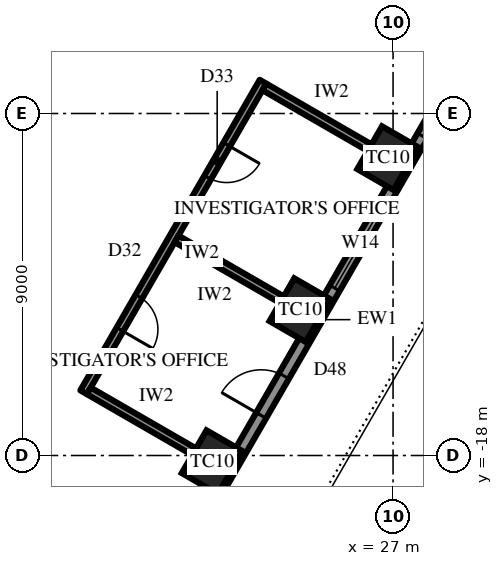
"""IFC4 building model, lengths in metres.
Left out: names, types, materials, properties, quantities, classifications, styles, units other than length and angle.
Written with IfcOpenShell. Run it as: python <this file> out.ifc"""

import sys

from ifc_helpers import new_model, si_unit, direction, frame, frame_2d, origin, origin_2d, place, context, subcontext, project, spatial, rectangle, extrude, element, fill, save


model = new_model("IFC4")
c1 = context("Model", 3, precision=1e-05, world=origin(), true_north=direction((0.0, 1.0)))
c2 = subcontext(c1, "Body", "Model", "MODEL_VIEW")
j1 = project(units=[si_unit("LENGTHUNIT", "METRE"), si_unit("PLANEANGLEUNIT", "RADIAN")], contexts=[c1])
p1 = place(None, origin())
s1 = spatial("IfcSite", under=j1, at=p1, CompositionType="ELEMENT")
p2 = place(p1, origin())
s2 = spatial("IfcBuilding", under=s1, at=p2, CompositionType="ELEMENT")
p3 = place(p2, frame((0.0, 0.0, 240.7)))
s3 = spatial("IfcBuildingStorey", under=s2, at=p3, CompositionType="ELEMENT", Elevation=240.7)
for number, where, z_axis, x_axis in (
    (1, (22.242, -18.175, 0.0), (0.0, 0.0, 1.0), (0.5, 0.866, 0.0)),
    (2, (24.552, -14.175, 0.0), (0.0, 0.0, 1.0), (0.5, 0.866, 0.0)),
    (3, (26.861, -10.175, 0.0), (0.0, 0.0, 1.0), (0.5, 0.866, 0.0)),
):
    element("IfcColumn", number, at=place(p3, frame(where, z_axis=z_axis, x_axis=x_axis)), inside=s3, PredefinedType="COLUMN", context=c2, shape_type="SweptSolid", body=[
        extrude(rectangle(XDim=1.3, YDim=1.1, at=origin_2d()), origin(), (0.0, 0.0, 1.0), 4.2),
    ])
p4 = place(p3, frame((18.707, -25.299, 0.0), z_axis=(0.0, 0.0, 1.0), x_axis=(0.500000442367, 0.866025148383, 0.0)))
e4 = element("IfcWall", 4, at=p4, inside=s3, PredefinedType="SOLIDWALL", context=c2, shape_type="SweptSolid", body=[
    extrude(rectangle(XDim=25.113, YDim=0.3, at=frame_2d((12.556, 0.0))), origin(), (0.0, 0.0, 1.0), 2.8),
])
p5 = place(p4, frame((4.278, 0.0, 0.6)))
e5 = element("IfcOpeningElement", 5, at=p5, cuts=e4, PredefinedType="OPENING", context=c2, shape_type="SweptSolid", body=[
    extrude(rectangle(XDim=2.7, YDim=1.95, at=frame_2d((1.35, 0.975))), frame((0.0, 0.16, 0.0), z_axis=(0.0, -1.0, 0.0), x_axis=(1.0, 0.0, 0.0)), (0.0, 0.0, 1.0), 0.32),
])
p6 = place(p4, frame((9.647, 0.0, 0.0)))
e6 = element("IfcOpeningElement", 6, at=p6, cuts=e4, PredefinedType="OPENING", context=c2, shape_type="SweptSolid", body=[
    extrude(rectangle(XDim=1.2, YDim=2.4, at=frame_2d((0.6, 1.2))), frame((0.0, 0.16, 0.0), z_axis=(0.0, -1.0, 0.0), x_axis=(1.0, 0.0, 0.0)), (0.0, 0.0, 1.0), 0.32),
])
p7 = place(p4, frame((13.516, 0.0, 0.6)))
e7 = element("IfcOpeningElement", 7, at=p7, cuts=e4, PredefinedType="OPENING", context=c2, shape_type="SweptSolid", body=[
    extrude(rectangle(XDim=2.7, YDim=1.95, at=frame_2d((1.35, 0.975))), frame((0.0, 0.16, 0.0), z_axis=(0.0, -1.0, 0.0), x_axis=(1.0, 0.0, 0.0)), (0.0, 0.0, 1.0), 0.32),
])
p8 = place(p4, frame((18.135, 0.0, 0.6)))
e8 = element("IfcOpeningElement", 8, at=p8, cuts=e4, PredefinedType="OPENING", context=c2, shape_type="SweptSolid", body=[
    extrude(rectangle(XDim=2.7, YDim=1.95, at=frame_2d((1.35, 0.975))), frame((0.0, 0.16, 0.0), z_axis=(0.0, -1.0, 0.0), x_axis=(1.0, 0.0, 0.0)), (0.0, 0.0, 1.0), 0.32),
])
p9 = place(p3, frame((18.858, -16.337, 0.0), z_axis=(0.0, 0.0, 1.0), x_axis=(0.499989672313, 0.866031366395, 0.0)))
e9 = element("IfcWall", 9, at=p9, inside=s3, PredefinedType="PARTITIONING", context=c2, shape_type="SweptSolid", body=[
    extrude(rectangle(XDim=9.438, YDim=0.2, at=frame_2d((4.719, 0.0))), origin(), (0.0, 0.0, 1.0), 4.0),
])
p10 = place(p9, frame((1.909, 0.0, 0.0)))
e10 = element("IfcOpeningElement", 10, at=p10, cuts=e9, PredefinedType="OPENING", context=c2, shape_type="SweptSolid", body=[
    extrude(rectangle(XDim=1.0, YDim=2.2, at=frame_2d((0.5, 1.1))), frame((0.0, 0.11, 0.0), z_axis=(0.0, -1.0, 0.0), x_axis=(1.0, 0.0, 0.0)), (0.0, 0.0, 1.0), 0.22),
])
p11 = place(p9, frame((6.528, 0.0, 0.0)))
e11 = element("IfcOpeningElement", 11, at=p11, cuts=e9, PredefinedType="OPENING", context=c2, shape_type="SweptSolid", body=[
    extrude(rectangle(XDim=1.0, YDim=2.2, at=frame_2d((0.5, 1.1))), frame((0.0, 0.11, 0.0), z_axis=(0.0, -1.0, 0.0), x_axis=(1.0, 0.0, 0.0)), (0.0, 0.0, 1.0), 0.22),
])
for number, where, z_axis, x_axis in (
    (12, (18.995, -16.3, 0.0), (0.0, 0.0, 1.0), (0.866, -0.5, 0.0)),
    (13, (21.304, -12.3, 0.0), (0.0, 0.0, 1.0), (0.866, -0.5, 0.0)),
):
    element("IfcWall", number, at=place(p3, frame(where, z_axis=z_axis, x_axis=x_axis)), inside=s3, PredefinedType="PARTITIONING", context=c2, shape_type="SweptSolid", body=[
        extrude(rectangle(XDim=3.2, YDim=0.2, at=frame_2d((1.6, 0.0))), origin(), (0.0, 0.0, 1.0), 3.082),
    ])
p12 = place(p3, frame((23.614, -8.3, 0.0), z_axis=(0.0, 0.0, 1.0), x_axis=(0.866061088033, -0.499938187974, 0.0)))
e14 = element("IfcWall", 14, at=p12, inside=s3, PredefinedType="PARTITIONING", context=c2, shape_type="SweptSolid", body=[
    extrude(rectangle(XDim=3.2, YDim=0.2, at=frame_2d((1.6, 0.0))), origin(), (0.0, 0.0, 1.0), 3.082),
])
p13 = place(p6, origin())
e15 = element("IfcDoor", 15, at=p13, inside=s3, OperationType="SINGLE_SWING_RIGHT", PredefinedType="DOOR", context=c2, shape_type="SweptSolid", body=[
    extrude(rectangle(XDim=1.2, YDim=2.4, at=frame_2d((0.6, 1.2))), frame((0.0, 0.025, 0.0), z_axis=(0.0, -1.0, 0.0), x_axis=(1.0, 0.0, 0.0)), (0.0, 0.0, 1.0), 0.05),
])
fill(e6, e15)
p14 = place(p7, origin())
e16 = element("IfcWindow", 16, at=p14, inside=s3, PartitioningType="SINGLE_PANEL", PredefinedType="WINDOW", context=c2, shape_type="SweptSolid", body=[
    extrude(rectangle(XDim=2.7, YDim=1.95, at=frame_2d((1.35, 0.975))), frame((0.0, 0.03, 0.0), z_axis=(0.0, -1.0, 0.0), x_axis=(1.0, 0.0, 0.0)), (0.0, 0.0, 1.0), 0.06),
])
fill(e7, e16)
p15 = place(p8, origin())
e17 = element("IfcWindow", 17, at=p15, inside=s3, PartitioningType="SINGLE_PANEL", PredefinedType="WINDOW", context=c2, shape_type="SweptSolid", body=[
    extrude(rectangle(XDim=2.7, YDim=1.95, at=frame_2d((1.35, 0.975))), frame((0.0, 0.03, 0.0), z_axis=(0.0, -1.0, 0.0), x_axis=(1.0, 0.0, 0.0)), (0.0, 0.0, 1.0), 0.06),
])
fill(e8, e17)
p16 = place(p10, frame((1.0, 0.0, 0.0), z_axis=(0.0, 0.0, 1.0), x_axis=(-1.0, 0.0, 0.0)))
e18 = element("IfcDoor", 18, at=p16, inside=s3, OperationType="SINGLE_SWING_LEFT", PredefinedType="DOOR", context=c2, shape_type="SweptSolid", body=[
    extrude(rectangle(XDim=1.0, YDim=2.2, at=frame_2d((0.5, 1.1))), frame((0.0, 0.025, 0.0), z_axis=(0.0, -1.0, 0.0), x_axis=(1.0, 0.0, 0.0)), (0.0, 0.0, 1.0), 0.05),
])
fill(e10, e18)
p17 = place(p11, frame((1.0, 0.0, 0.0), z_axis=(0.0, 0.0, 1.0), x_axis=(-1.0, 0.0, 0.0)))
e19 = element("IfcDoor", 19, at=p17, inside=s3, OperationType="SINGLE_SWING_RIGHT", PredefinedType="DOOR", context=c2, shape_type="SweptSolid", body=[
    extrude(rectangle(XDim=1.0, YDim=2.2, at=frame_2d((0.5, 1.1))), frame((0.0, 0.025, 0.0), z_axis=(0.0, -1.0, 0.0), x_axis=(1.0, 0.0, 0.0)), (0.0, 0.0, 1.0), 0.05),
])
fill(e11, e19)
save(model, sys.argv[1])
